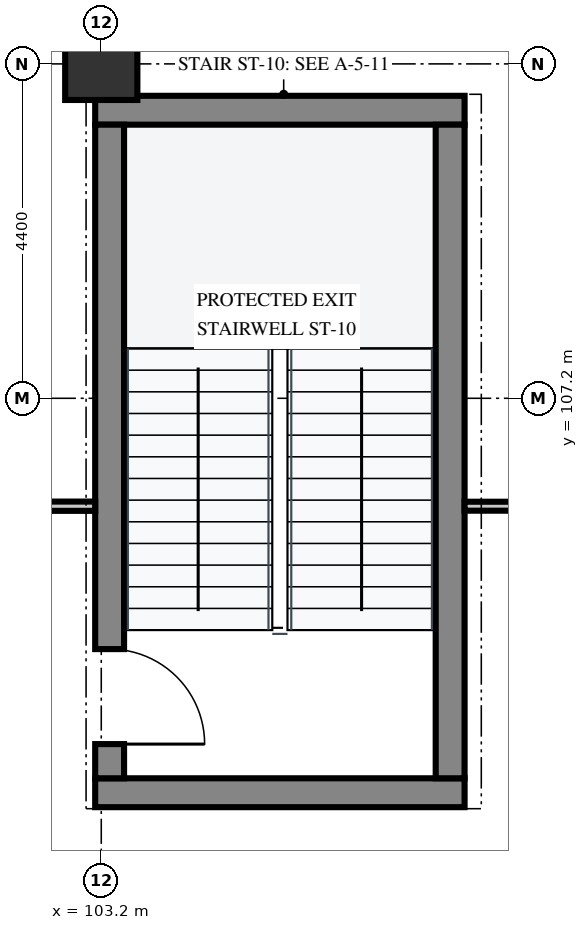
"""IFC4 building model, lengths in metres.
Left out: names, types, materials, properties, quantities, classifications, styles, units other than length and angle.
Written with IfcOpenShell. Run it as: python <this file> out.ifc"""

import sys

from ifc_helpers import new_model, si_unit, direction, frame, frame_2d, origin, origin_2d, place, context, subcontext, project, spatial, rectangle, extrude, element, fill, save


model = new_model("IFC4")
c1 = context("Model", 3, precision=1e-05, world=origin(), true_north=direction((0.0, 1.0)))
c2 = subcontext(c1, "Body", "Model", "MODEL_VIEW")
j1 = project(units=[si_unit("LENGTHUNIT", "METRE"), si_unit("PLANEANGLEUNIT", "RADIAN")], contexts=[c1])
p1 = place(None, origin())
s1 = spatial("IfcSite", under=j1, at=p1, CompositionType="ELEMENT")
p2 = place(p1, origin())
s2 = spatial("IfcBuilding", under=s1, at=p2, CompositionType="ELEMENT")
p3 = place(p2, frame((0.0, 0.0, 5.4)))
s3 = spatial("IfcBuildingStorey", under=s2, at=p3, CompositionType="ELEMENT", Elevation=5.4)
p4 = place(p3, frame((103.2, 111.6, 0.0), z_axis=(0.0, 0.0, 1.0), x_axis=(1.0, 0.0, 0.0)))
e1 = element("IfcColumn", 1, at=p4, inside=s3, PredefinedType="COLUMN", context=c2, shape_type="SweptSolid", body=[
    extrude(rectangle(XDim=0.95, YDim=0.95, at=origin_2d()), origin(), (0.0, 0.0, 1.0), 4.8),
])
for number, where, z_axis, x_axis in (
    (2, (103.12, 102.01, 0.0), (0.0, 0.0, 1.0), (1.0, 0.0, 0.0)),
    (3, (103.12, 110.99, 0.0), (0.0, 0.0, 1.0), (1.0, 0.0, 0.0)),
):
    element("IfcWall", number, at=place(p3, frame(where, z_axis=z_axis, x_axis=x_axis)), inside=s3, PredefinedType="SHEAR", context=c2, shape_type="SweptSolid", body=[
        extrude(rectangle(XDim=4.86, YDim=0.38, at=frame_2d((2.43, 0.0))), origin(), (0.0, 0.0, 1.0), 4.505),
    ])
p5 = place(p3, frame((107.79, 102.2, 0.0), z_axis=(0.0, 0.0, 1.0), x_axis=(0.0, 1.0, 0.0)))
e4 = element("IfcWall", 4, at=p5, inside=s3, PredefinedType="SHEAR", context=c2, shape_type="SweptSolid", body=[
    extrude(rectangle(XDim=8.6, YDim=0.38, at=frame_2d((4.3, 0.0))), origin(), (0.0, 0.0, 1.0), 4.505),
])
p6 = place(p3, frame((103.31, 102.2, 0.0), z_axis=(0.0, 0.0, 1.0), x_axis=(0.0, 1.0, 0.0)))
e5 = element("IfcWall", 5, at=p6, inside=s3, PredefinedType="SHEAR", context=c2, shape_type="SweptSolid", body=[
    extrude(rectangle(XDim=8.6, YDim=0.38, at=frame_2d((4.3, 0.0))), origin(), (0.0, 0.0, 1.0), 4.505),
])
p7 = place(p6, frame((0.45, 0.0, 0.0)))
e6 = element("IfcOpeningElement", 6, at=p7, cuts=e5, PredefinedType="OPENING", context=c2, shape_type="SweptSolid", body=[
    extrude(rectangle(XDim=1.25, YDim=2.2, at=frame_2d((0.625, 1.1))), frame((0.0, 0.202, 0.0), z_axis=(0.0, -1.0, 0.0), x_axis=(1.0, 0.0, 0.0)), (0.0, 0.0, 1.0), 0.404),
])
p8 = place(p3, frame((103.12, 105.78, 0.0), z_axis=(0.0, 0.0, 1.0), x_axis=(-1.0, 0.0, 0.0)))
e7 = element("IfcWall", 7, at=p8, inside=s3, PredefinedType="PARTITIONING", context=c2, shape_type="SweptSolid", body=[
    extrude(rectangle(XDim=43.0, YDim=0.122, at=frame_2d((21.5, 0.0))), origin(), (0.0, 0.0, 1.0), 3.445),
])
p9 = place(p8, frame((20.87, 0.0, 0.0)))
e8 = element("IfcOpeningElement", 8, at=p9, cuts=e7, PredefinedType="OPENING", context=c2, shape_type="SweptSolid", body=[
    extrude(rectangle(XDim=1.92, YDim=2.38, at=frame_2d((0.96, 1.19))), frame((0.0, 0.073, 0.0), z_axis=(0.0, -1.0, 0.0), x_axis=(1.0, 0.0, 0.0)), (0.0, 0.0, 1.0), 0.146),
])
p10 = place(p3, frame((121.08, 105.78, 0.0), z_axis=(0.0, 0.0, 1.0), x_axis=(-1.0, 0.0, 0.0)))
e9 = element("IfcWall", 9, at=p10, inside=s3, PredefinedType="PARTITIONING", context=c2, shape_type="SweptSolid", body=[
    extrude(rectangle(XDim=13.1, YDim=0.118, at=frame_2d((6.55, 0.0))), origin(), (0.0, 0.0, 1.0), 3.445),
])
p11 = place(p7, frame((1.25, 0.0, 0.0), z_axis=(0.0, 0.0, 1.0), x_axis=(-1.0, 0.0, 0.0)))
e10 = element("IfcDoor", 10, at=p11, inside=s3, OperationType="SINGLE_SWING_RIGHT", PredefinedType="DOOR", context=c2, shape_type="SweptSolid", body=[
    extrude(rectangle(XDim=1.25, YDim=2.2, at=frame_2d((0.625, 1.1))), frame((0.0, 0.025, 0.0), z_axis=(0.0, -1.0, 0.0), x_axis=(1.0, 0.0, 0.0)), (0.0, 0.0, 1.0), 0.05),
])
fill(e6, e10)
save(model, sys.argv[1])
